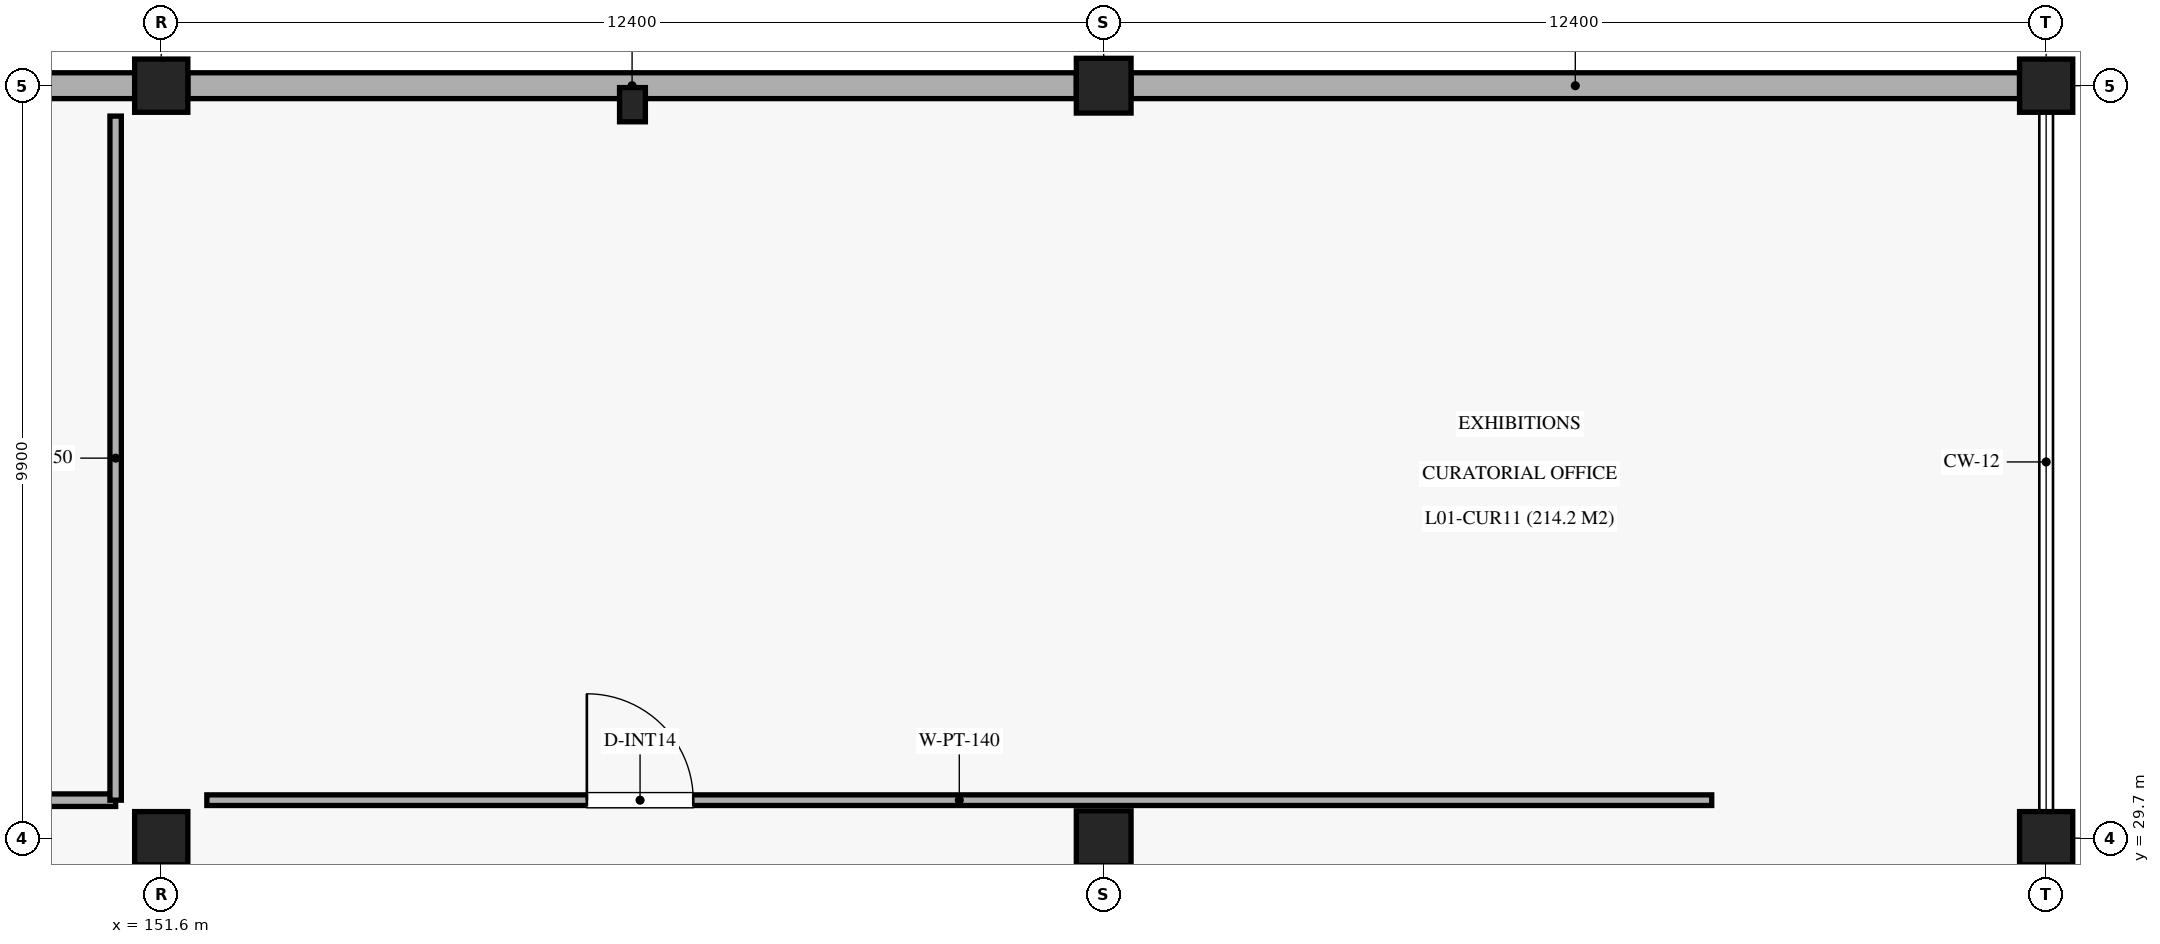
"""IFC4 building model, lengths in metres.
Left out: names, types, materials, properties, quantities, classifications, styles, units other than length and angle.
Written with IfcOpenShell. Run it as: python <this file> out.ifc"""

import sys

from ifc_helpers import new_model, si_unit, direction, frame, frame_2d, origin, origin_2d, place, context, subcontext, project, spatial, rectangle, circle, extrude, element, fill, save


model = new_model("IFC4")
c1 = context("Model", 3, precision=1e-05, world=origin(), true_north=direction((0.0, 1.0)))
c2 = subcontext(c1, "Body", "Model", "MODEL_VIEW")
j1 = project(units=[si_unit("LENGTHUNIT", "METRE"), si_unit("PLANEANGLEUNIT", "RADIAN")], contexts=[c1])
p1 = place(None, origin())
s1 = spatial("IfcSite", under=j1, at=p1, CompositionType="ELEMENT")
p2 = place(p1, origin())
s2 = spatial("IfcBuilding", under=s1, at=p2, CompositionType="ELEMENT")
p3 = place(p2, frame((0.0, 0.0, 5.44)))
s3 = spatial("IfcBuildingStorey", under=s2, at=p3, CompositionType="ELEMENT", Elevation=5.44)
for number, where, z_axis, x_axis in (
    (1, (151.6, 29.7, 0.0), (0.0, 0.0, 1.0), (1.0, 0.0, 0.0)),
    (2, (151.6, 39.6, 0.0), (0.0, 0.0, 1.0), (1.0, 0.0, 0.0)),
):
    element("IfcColumn", number, at=place(p3, frame(where, z_axis=z_axis, x_axis=x_axis)), inside=s3, PredefinedType="COLUMN", context=c2, shape_type="SweptSolid", body=[
        extrude(rectangle(XDim=0.7, YDim=0.7, at=origin_2d()), origin(), (0.0, 0.0, 1.0), 5.44),
    ])
for number, where, z_axis, x_axis in (
    (3, (164.0, 29.7, 0.0), (0.0, 0.0, 1.0), (1.0, 0.0, 0.0)),
    (4, (164.0, 39.6, 0.0), (0.0, 0.0, 1.0), (1.0, 0.0, 0.0)),
):
    element("IfcColumn", number, at=place(p3, frame(where, z_axis=z_axis, x_axis=x_axis)), inside=s3, PredefinedType="COLUMN", context=c2, shape_type="SweptSolid", body=[
        extrude(circle(Radius=0.36, at=origin_2d()), origin(), (0.0, 0.0, 1.0), 5.44),
    ])
for number, where, z_axis, x_axis in (
    (5, (176.4, 29.7, 0.0), (0.0, 0.0, 1.0), (1.0, 0.0, 0.0)),
    (6, (176.4, 39.6, 0.0), (0.0, 0.0, 1.0), (1.0, 0.0, 0.0)),
):
    element("IfcColumn", number, at=place(p3, frame(where, z_axis=z_axis, x_axis=x_axis)), inside=s3, PredefinedType="COLUMN", context=c2, shape_type="SweptSolid", body=[
        extrude(rectangle(XDim=0.7, YDim=0.7, at=origin_2d()), origin(), (0.0, 0.0, 1.0), 5.44),
    ])
p4 = place(p3, frame((157.8, 39.35, 0.0), z_axis=(0.0, 0.0, 1.0), x_axis=(1.0, 0.0, 0.0)))
e7 = element("IfcColumn", 7, at=p4, inside=s3, PredefinedType="PILASTER", context=c2, shape_type="SweptSolid", body=[
    extrude(rectangle(XDim=0.34, YDim=0.45, at=origin_2d()), origin(), (0.0, 0.0, 1.0), 5.44),
])
p5 = place(p3, frame((139.55, 39.6, 0.0), z_axis=(0.0, 0.0, 1.0), x_axis=(1.0, 0.0, 0.0)))
e8 = element("IfcWall", 8, at=p5, inside=s3, PredefinedType="SOLIDWALL", context=c2, shape_type="SweptSolid", body=[
    extrude(rectangle(XDim=11.7, YDim=0.34, at=frame_2d((5.85, 0.0))), origin(), (0.0, 0.0, 1.0), 4.33),
])
for number, where, z_axis, x_axis in (
    (9, (151.95, 39.6, 0.0), (0.0, 0.0, 1.0), (1.0, 0.0, 0.0)),
    (10, (164.36, 39.6, 0.0), (0.0, 0.0, 1.0), (1.0, 0.0, 0.0)),
):
    element("IfcWall", number, at=place(p3, frame(where, z_axis=z_axis, x_axis=x_axis)), inside=s3, PredefinedType="SOLIDWALL", context=c2, shape_type="SweptSolid", body=[
        extrude(rectangle(XDim=11.69, YDim=0.34, at=frame_2d((5.845, 0.0))), origin(), (0.0, 0.0, 1.0), 4.33),
    ])
p6 = place(p3, frame((115.0, 30.2, 0.0), z_axis=(0.0, 0.0, 1.0), x_axis=(1.0, 0.0, 0.0)))
e11 = element("IfcWall", 11, at=p6, inside=s3, PredefinedType="PARTITIONING", context=c2, shape_type="SweptSolid", body=[
    extrude(rectangle(XDim=36.0, YDim=0.165, at=frame_2d((18.0, 0.0))), origin(), (0.0, 0.0, 1.0), 4.3),
])
p7 = place(p6, frame((20.0, 0.0, 0.0)))
e12 = element("IfcOpeningElement", 12, at=p7, cuts=e11, PredefinedType="OPENING", context=c2, shape_type="SweptSolid", body=[
    extrude(rectangle(XDim=1.8, YDim=2.45, at=frame_2d((0.9, 1.225))), frame((0.0, 0.093, 0.0), z_axis=(0.0, -1.0, 0.0), x_axis=(1.0, 0.0, 0.0)), (0.0, 0.0, 1.0), 0.185),
])
p8 = place(p3, frame((151.0, 30.2, 0.0), z_axis=(0.0, 0.0, 1.0), x_axis=(0.0, 1.0, 0.0)))
e13 = element("IfcWall", 13, at=p8, inside=s3, PredefinedType="PARTITIONING", context=c2, shape_type="SweptSolid", body=[
    extrude(rectangle(XDim=9.0, YDim=0.15, at=frame_2d((4.5, 0.0))), origin(), (0.0, 0.0, 1.0), 4.3),
])
p9 = place(p3, frame((152.2, 30.2, 0.0), z_axis=(0.0, 0.0, 1.0), x_axis=(1.0, 0.0, 0.0)))
e14 = element("IfcWall", 14, at=p9, inside=s3, PredefinedType="PARTITIONING", context=c2, shape_type="SweptSolid", body=[
    extrude(rectangle(XDim=19.8, YDim=0.14, at=frame_2d((9.9, 0.0))), origin(), (0.0, 0.0, 1.0), 4.3),
])
p10 = place(p9, frame((5.0, 0.0, 0.0)))
e15 = element("IfcOpeningElement", 15, at=p10, cuts=e14, PredefinedType="OPENING", context=c2, shape_type="SweptSolid", body=[
    extrude(rectangle(XDim=1.4, YDim=2.2, at=frame_2d((0.7, 1.1))), frame((0.0, 0.08, 0.0), z_axis=(0.0, -1.0, 0.0), x_axis=(1.0, 0.0, 0.0)), (0.0, 0.0, 1.0), 0.16),
])
p11 = place(p10, origin())
e16 = element("IfcDoor", 16, at=p11, inside=s3, OperationType="SINGLE_SWING_LEFT", PredefinedType="DOOR", context=c2, shape_type="SweptSolid", body=[
    extrude(rectangle(XDim=1.4, YDim=2.2, at=frame_2d((0.7, 1.1))), frame((0.0, 0.025, 0.0), z_axis=(0.0, -1.0, 0.0), x_axis=(1.0, 0.0, 0.0)), (0.0, 0.0, 1.0), 0.05),
])
fill(e15, e16)
save(model, sys.argv[1])
